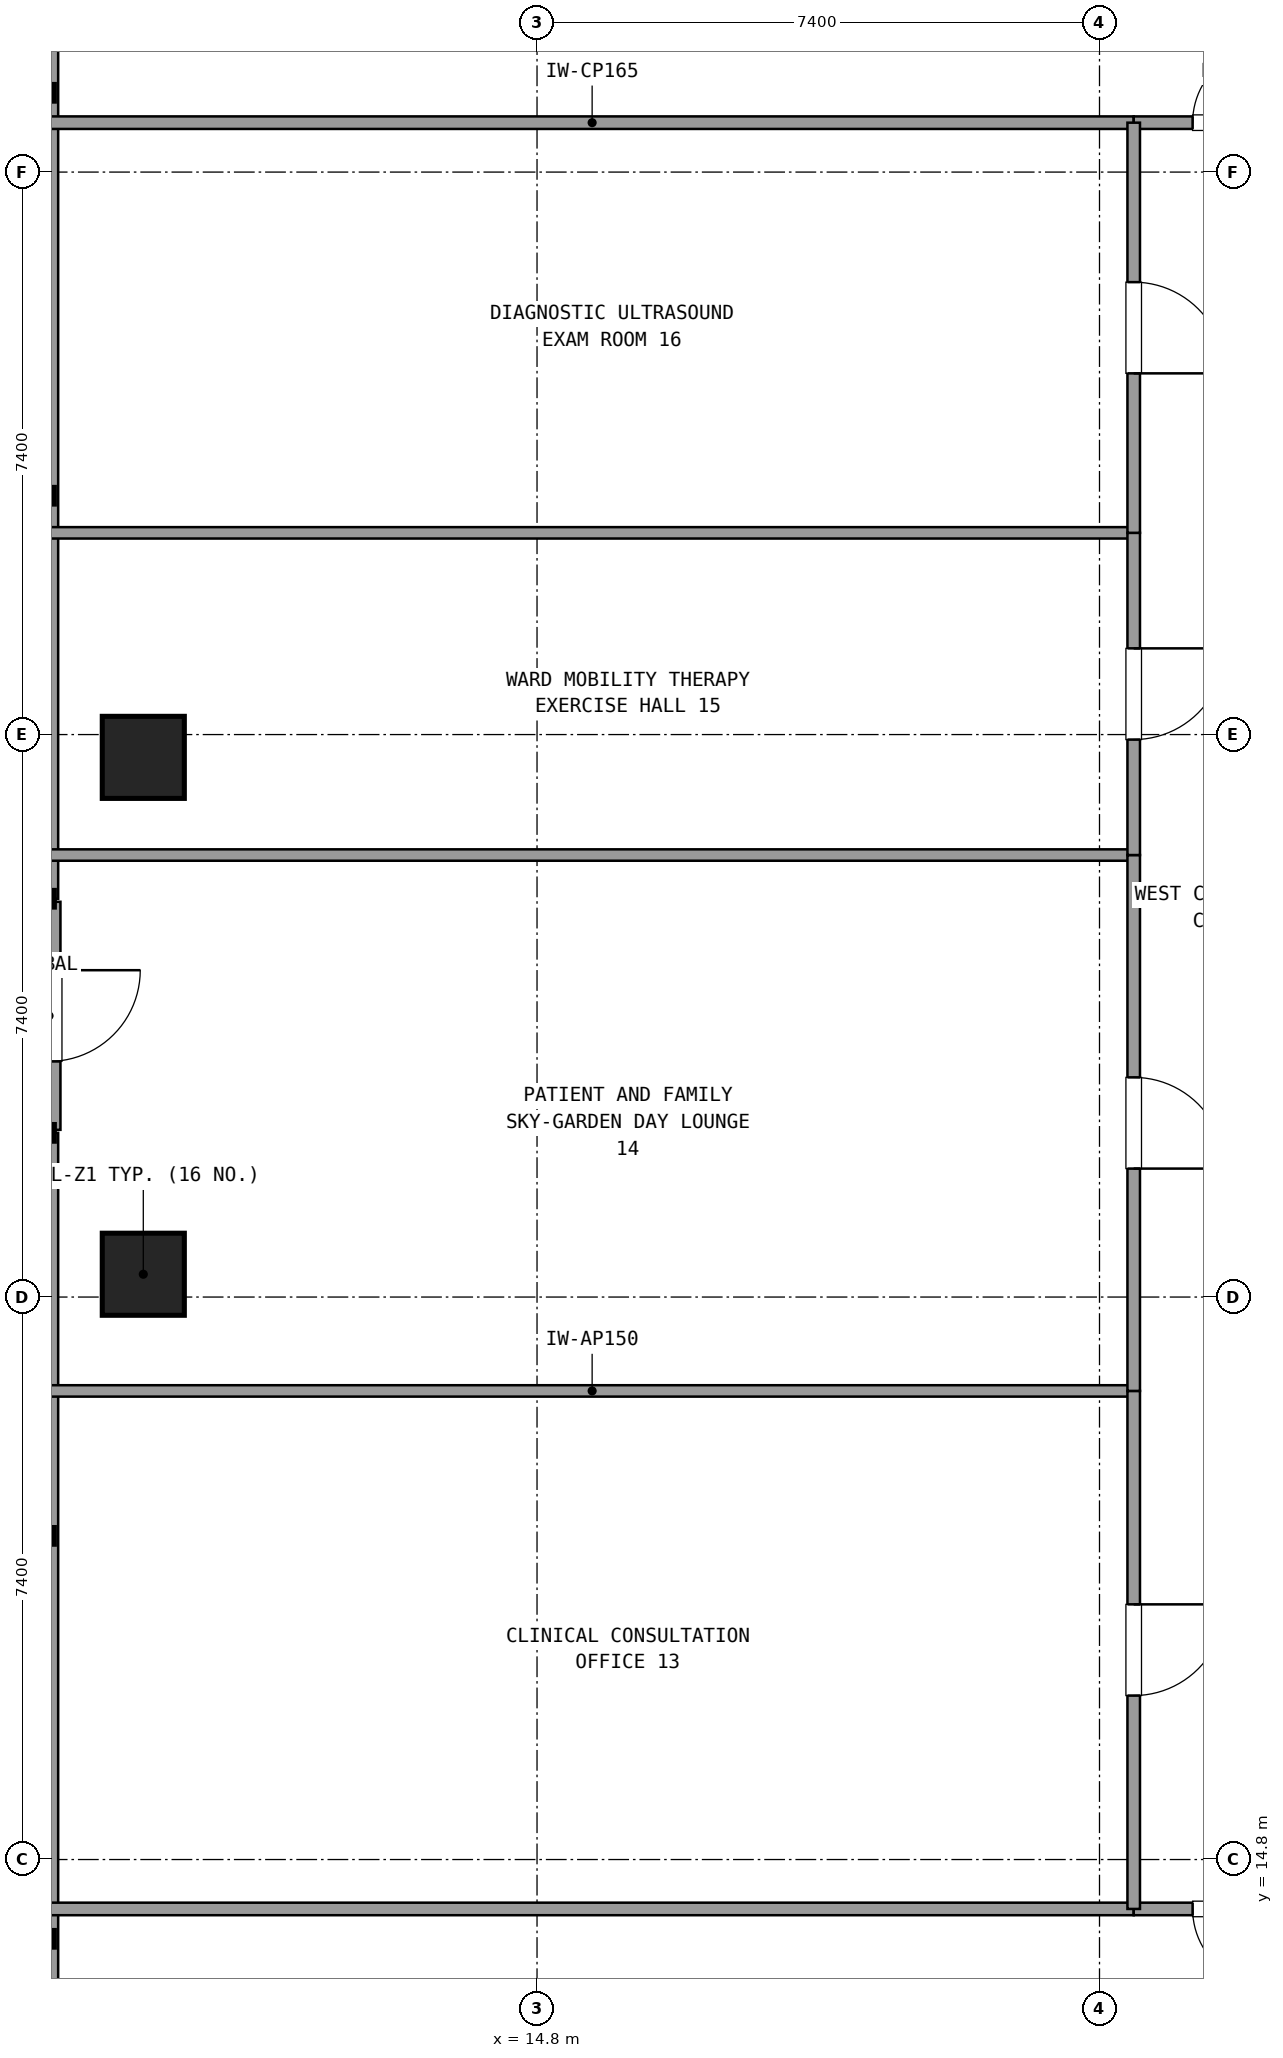
"""IFC4 building model, lengths in metres.
Left out: names, types, materials, properties, quantities, classifications, styles, units other than length and angle.
Written with IfcOpenShell. Run it as: python <this file> out.ifc"""

import sys

from ifc_helpers import new_model, si_unit, direction, frame, frame_2d, origin, origin_2d, place, context, subcontext, project, spatial, rectangle, extrude, element, fill, save


model = new_model("IFC4")
c1 = context("Model", 3, precision=1e-05, world=origin(), true_north=direction((0.0, 1.0)))
c2 = subcontext(c1, "Body", "Model", "MODEL_VIEW")
j1 = project(units=[si_unit("LENGTHUNIT", "METRE"), si_unit("PLANEANGLEUNIT", "RADIAN")], contexts=[c1])
p1 = place(None, origin())
s1 = spatial("IfcSite", under=j1, at=p1, CompositionType="ELEMENT")
p2 = place(p1, origin())
s2 = spatial("IfcBuilding", under=s1, at=p2, CompositionType="ELEMENT")
p3 = place(p2, frame((0.0, 0.0, 34.74)))
s3 = spatial("IfcBuildingStorey", under=s2, at=p3, CompositionType="ELEMENT", Elevation=34.74)
for number, where, z_axis, x_axis in (
    (1, (9.62, 22.5, 0.0), (0.0, 0.0, 1.0), (1.0, 0.0, 0.0)),
    (2, (9.62, 29.3, 0.0), (0.0, 0.0, 1.0), (1.0, 0.0, 0.0)),
):
    element("IfcColumn", number, at=place(p3, frame(where, z_axis=z_axis, x_axis=x_axis)), inside=s3, PredefinedType="COLUMN", context=c2, shape_type="SweptSolid", body=[
        extrude(rectangle(XDim=1.08, YDim=1.08, at=origin_2d()), origin(), (0.0, 0.0, 1.0), 3.6),
    ])
p4 = place(p3, frame((8.38, 27.4, 0.0), z_axis=(0.0, 0.0, 1.0), x_axis=(0.0, -1.0, 0.0)))
e3 = element("IfcWall", 3, at=p4, inside=s3, PredefinedType="SOLIDWALL", context=c2, shape_type="SweptSolid", body=[
    extrude(rectangle(XDim=3.0, YDim=0.3, at=frame_2d((1.5, 0.0))), origin(), (0.0, 0.0, 1.0), 2.65),
])
p5 = place(p4, frame((0.9, 0.0, 0.0)))
e4 = element("IfcOpeningElement", 4, at=p5, cuts=e3, PredefinedType="OPENING", context=c2, shape_type="SweptSolid", body=[
    extrude(rectangle(XDim=1.2, YDim=2.2, at=frame_2d((0.6, 1.1))), frame((0.0, 0.16, 0.0), z_axis=(0.0, -1.0, 0.0), x_axis=(1.0, 0.0, 0.0)), (0.0, 0.0, 1.0), 0.32),
])
for number, where, z_axis, x_axis in (
    (5, (8.38, 43.345, 0.0), (0.0, 0.0, 1.0), (0.0, -1.0, 0.0)),
    (6, (8.38, 24.36, 0.0), (0.0, 0.0, 1.0), (0.0, -1.0, 0.0)),
):
    element("IfcWall", number, at=place(p3, frame(where, z_axis=z_axis, x_axis=x_axis)), inside=s3, PredefinedType="SOLIDWALL", context=c2, shape_type="SweptSolid", body=[
        extrude(rectangle(XDim=15.905, YDim=0.24, at=frame_2d((7.953, 0.0))), origin(), (0.0, 0.0, 1.0), 0.85),
    ])
for number, where, z_axis, x_axis in (
    (7, (8.4, 37.65, 0.0), (0.0, 0.0, 1.0), (1.0, 0.0, 0.0)),
    (8, (8.4, 14.15, 0.0), (0.0, 0.0, 1.0), (1.0, 0.0, 0.0)),
):
    element("IfcWall", number, at=place(p3, frame(where, z_axis=z_axis, x_axis=x_axis)), inside=s3, PredefinedType="PARTITIONING", context=c2, shape_type="SweptSolid", body=[
        extrude(rectangle(XDim=14.25, YDim=0.165, at=frame_2d((7.125, 0.0))), origin(), (0.0, 0.0, 1.0), 2.61),
    ])
p6 = place(p3, frame((22.65, 37.65, 0.0), z_axis=(0.0, 0.0, 1.0), x_axis=(1.0, 0.0, 0.0)))
e9 = element("IfcWall", 9, at=p6, inside=s3, PredefinedType="PARTITIONING", context=c2, shape_type="SweptSolid", body=[
    extrude(rectangle(XDim=2.55, YDim=0.165, at=frame_2d((1.275, 0.0))), origin(), (0.0, 0.0, 1.0), 2.61),
])
p7 = place(p6, frame((0.775, 0.0, 0.0)))
e10 = element("IfcOpeningElement", 10, at=p7, cuts=e9, PredefinedType="OPENING", context=c2, shape_type="SweptSolid", body=[
    extrude(rectangle(XDim=1.0, YDim=2.15, at=frame_2d((0.5, 1.075))), frame((0.0, 0.093, 0.0), z_axis=(0.0, -1.0, 0.0), x_axis=(1.0, 0.0, 0.0)), (0.0, 0.0, 1.0), 0.185),
])
p8 = place(p3, frame((22.65, 14.15, 0.0), z_axis=(0.0, 0.0, 1.0), x_axis=(1.0, 0.0, 0.0)))
e11 = element("IfcWall", 11, at=p8, inside=s3, PredefinedType="PARTITIONING", context=c2, shape_type="SweptSolid", body=[
    extrude(rectangle(XDim=2.55, YDim=0.165, at=frame_2d((1.275, 0.0))), origin(), (0.0, 0.0, 1.0), 2.61),
])
p9 = place(p8, frame((0.775, 0.0, 0.0)))
e12 = element("IfcOpeningElement", 12, at=p9, cuts=e11, PredefinedType="OPENING", context=c2, shape_type="SweptSolid", body=[
    extrude(rectangle(XDim=1.0, YDim=2.15, at=frame_2d((0.5, 1.075))), frame((0.0, 0.093, 0.0), z_axis=(0.0, -1.0, 0.0), x_axis=(1.0, 0.0, 0.0)), (0.0, 0.0, 1.0), 0.185),
])
p10 = place(p3, frame((22.65, 20.965, 0.0), z_axis=(0.0, 0.0, 1.0), x_axis=(-1.0, 0.0, 0.0)))
e13 = element("IfcWall", 13, at=p10, inside=s3, PredefinedType="PARTITIONING", context=c2, shape_type="SweptSolid", body=[
    extrude(rectangle(XDim=14.25, YDim=0.15, at=frame_2d((7.125, 0.0))), origin(), (0.0, 0.0, 1.0), 2.61),
])
p11 = place(p3, frame((22.65, 14.15, 0.0), z_axis=(0.0, 0.0, 1.0), x_axis=(0.0, 1.0, 0.0)))
e14 = element("IfcWall", 14, at=p11, inside=s3, PredefinedType="PARTITIONING", context=c2, shape_type="SweptSolid", body=[
    extrude(rectangle(XDim=6.815, YDim=0.165, at=frame_2d((3.408, 0.0))), origin(), (0.0, 0.0, 1.0), 2.61),
])
p12 = place(p11, frame((2.807, 0.0, 0.0)))
e15 = element("IfcOpeningElement", 15, at=p12, cuts=e14, PredefinedType="OPENING", context=c2, shape_type="SweptSolid", body=[
    extrude(rectangle(XDim=1.2, YDim=2.15, at=frame_2d((0.6, 1.075))), frame((0.0, 0.093, 0.0), z_axis=(0.0, -1.0, 0.0), x_axis=(1.0, 0.0, 0.0)), (0.0, 0.0, 1.0), 0.185),
])
p13 = place(p3, frame((22.65, 28.015, 0.0), z_axis=(0.0, 0.0, 1.0), x_axis=(-1.0, 0.0, 0.0)))
e16 = element("IfcWall", 16, at=p13, inside=s3, PredefinedType="PARTITIONING", context=c2, shape_type="SweptSolid", body=[
    extrude(rectangle(XDim=14.25, YDim=0.15, at=frame_2d((7.125, 0.0))), origin(), (0.0, 0.0, 1.0), 2.61),
])
p14 = place(p3, frame((22.65, 20.965, 0.0), z_axis=(0.0, 0.0, 1.0), x_axis=(0.0, 1.0, 0.0)))
e17 = element("IfcWall", 17, at=p14, inside=s3, PredefinedType="PARTITIONING", context=c2, shape_type="SweptSolid", body=[
    extrude(rectangle(XDim=7.05, YDim=0.165, at=frame_2d((3.525, 0.0))), origin(), (0.0, 0.0, 1.0), 2.61),
])
p15 = place(p14, frame((2.925, 0.0, 0.0)))
e18 = element("IfcOpeningElement", 18, at=p15, cuts=e17, PredefinedType="OPENING", context=c2, shape_type="SweptSolid", body=[
    extrude(rectangle(XDim=1.2, YDim=2.15, at=frame_2d((0.6, 1.075))), frame((0.0, 0.093, 0.0), z_axis=(0.0, -1.0, 0.0), x_axis=(1.0, 0.0, 0.0)), (0.0, 0.0, 1.0), 0.185),
])
p16 = place(p3, frame((22.65, 32.254, 0.0), z_axis=(0.0, 0.0, 1.0), x_axis=(-1.0, 0.0, 0.0)))
e19 = element("IfcWall", 19, at=p16, inside=s3, PredefinedType="PARTITIONING", context=c2, shape_type="SweptSolid", body=[
    extrude(rectangle(XDim=14.25, YDim=0.15, at=frame_2d((7.125, 0.0))), origin(), (0.0, 0.0, 1.0), 2.61),
])
p17 = place(p3, frame((22.65, 28.015, 0.0), z_axis=(0.0, 0.0, 1.0), x_axis=(0.0, 1.0, 0.0)))
e20 = element("IfcWall", 20, at=p17, inside=s3, PredefinedType="PARTITIONING", context=c2, shape_type="SweptSolid", body=[
    extrude(rectangle(XDim=4.239, YDim=0.165, at=frame_2d((2.12, 0.0))), origin(), (0.0, 0.0, 1.0), 2.61),
])
p18 = place(p17, frame((1.519, 0.0, 0.0)))
e21 = element("IfcOpeningElement", 21, at=p18, cuts=e20, PredefinedType="OPENING", context=c2, shape_type="SweptSolid", body=[
    extrude(rectangle(XDim=1.2, YDim=2.15, at=frame_2d((0.6, 1.075))), frame((0.0, 0.093, 0.0), z_axis=(0.0, -1.0, 0.0), x_axis=(1.0, 0.0, 0.0)), (0.0, 0.0, 1.0), 0.185),
])
p19 = place(p3, frame((22.65, 32.254, 0.0), z_axis=(0.0, 0.0, 1.0), x_axis=(0.0, 1.0, 0.0)))
e22 = element("IfcWall", 22, at=p19, inside=s3, PredefinedType="PARTITIONING", context=c2, shape_type="SweptSolid", body=[
    extrude(rectangle(XDim=5.396, YDim=0.165, at=frame_2d((2.698, 0.0))), origin(), (0.0, 0.0, 1.0), 2.61),
])
p20 = place(p19, frame((2.098, 0.0, 0.0)))
e23 = element("IfcOpeningElement", 23, at=p20, cuts=e22, PredefinedType="OPENING", context=c2, shape_type="SweptSolid", body=[
    extrude(rectangle(XDim=1.2, YDim=2.15, at=frame_2d((0.6, 1.075))), frame((0.0, 0.093, 0.0), z_axis=(0.0, -1.0, 0.0), x_axis=(1.0, 0.0, 0.0)), (0.0, 0.0, 1.0), 0.185),
])
p21 = place(p7, origin())
e24 = element("IfcDoor", 24, at=p21, inside=s3, OperationType="SINGLE_SWING_RIGHT", PredefinedType="DOOR", context=c2, shape_type="SweptSolid", body=[
    extrude(rectangle(XDim=1.0, YDim=2.15, at=frame_2d((0.5, 1.075))), frame((0.0, 0.025, 0.0), z_axis=(0.0, -1.0, 0.0), x_axis=(1.0, 0.0, 0.0)), (0.0, 0.0, 1.0), 0.05),
])
fill(e10, e24)
p22 = place(p9, frame((1.0, 0.0, 0.0), z_axis=(0.0, 0.0, 1.0), x_axis=(-1.0, 0.0, 0.0)))
e25 = element("IfcDoor", 25, at=p22, inside=s3, OperationType="SINGLE_SWING_RIGHT", PredefinedType="DOOR", context=c2, shape_type="SweptSolid", body=[
    extrude(rectangle(XDim=1.0, YDim=2.15, at=frame_2d((0.5, 1.075))), frame((0.0, 0.025, 0.0), z_axis=(0.0, -1.0, 0.0), x_axis=(1.0, 0.0, 0.0)), (0.0, 0.0, 1.0), 0.05),
])
fill(e12, e25)
p23 = place(p12, frame((1.2, 0.0, 0.0), z_axis=(0.0, 0.0, 1.0), x_axis=(-1.0, 0.0, 0.0)))
e26 = element("IfcDoor", 26, at=p23, inside=s3, OperationType="SINGLE_SWING_RIGHT", PredefinedType="DOOR", context=c2, shape_type="SweptSolid", body=[
    extrude(rectangle(XDim=1.2, YDim=2.15, at=frame_2d((0.6, 1.075))), frame((0.0, 0.025, 0.0), z_axis=(0.0, -1.0, 0.0), x_axis=(1.0, 0.0, 0.0)), (0.0, 0.0, 1.0), 0.05),
])
fill(e15, e26)
p24 = place(p15, frame((1.2, 0.0, 0.0), z_axis=(0.0, 0.0, 1.0), x_axis=(-1.0, 0.0, 0.0)))
e27 = element("IfcDoor", 27, at=p24, inside=s3, OperationType="SINGLE_SWING_LEFT", PredefinedType="DOOR", context=c2, shape_type="SweptSolid", body=[
    extrude(rectangle(XDim=1.2, YDim=2.15, at=frame_2d((0.6, 1.075))), frame((0.0, 0.025, 0.0), z_axis=(0.0, -1.0, 0.0), x_axis=(1.0, 0.0, 0.0)), (0.0, 0.0, 1.0), 0.05),
])
fill(e18, e27)
p25 = place(p18, frame((1.2, 0.0, 0.0), z_axis=(0.0, 0.0, 1.0), x_axis=(-1.0, 0.0, 0.0)))
e28 = element("IfcDoor", 28, at=p25, inside=s3, OperationType="SINGLE_SWING_RIGHT", PredefinedType="DOOR", context=c2, shape_type="SweptSolid", body=[
    extrude(rectangle(XDim=1.2, YDim=2.15, at=frame_2d((0.6, 1.075))), frame((0.0, 0.025, 0.0), z_axis=(0.0, -1.0, 0.0), x_axis=(1.0, 0.0, 0.0)), (0.0, 0.0, 1.0), 0.05),
])
fill(e21, e28)
p26 = place(p20, frame((1.2, 0.0, 0.0), z_axis=(0.0, 0.0, 1.0), x_axis=(-1.0, 0.0, 0.0)))
e29 = element("IfcDoor", 29, at=p26, inside=s3, OperationType="SINGLE_SWING_LEFT", PredefinedType="DOOR", context=c2, shape_type="SweptSolid", body=[
    extrude(rectangle(XDim=1.2, YDim=2.15, at=frame_2d((0.6, 1.075))), frame((0.0, 0.025, 0.0), z_axis=(0.0, -1.0, 0.0), x_axis=(1.0, 0.0, 0.0)), (0.0, 0.0, 1.0), 0.05),
])
fill(e23, e29)
save(model, sys.argv[1])
